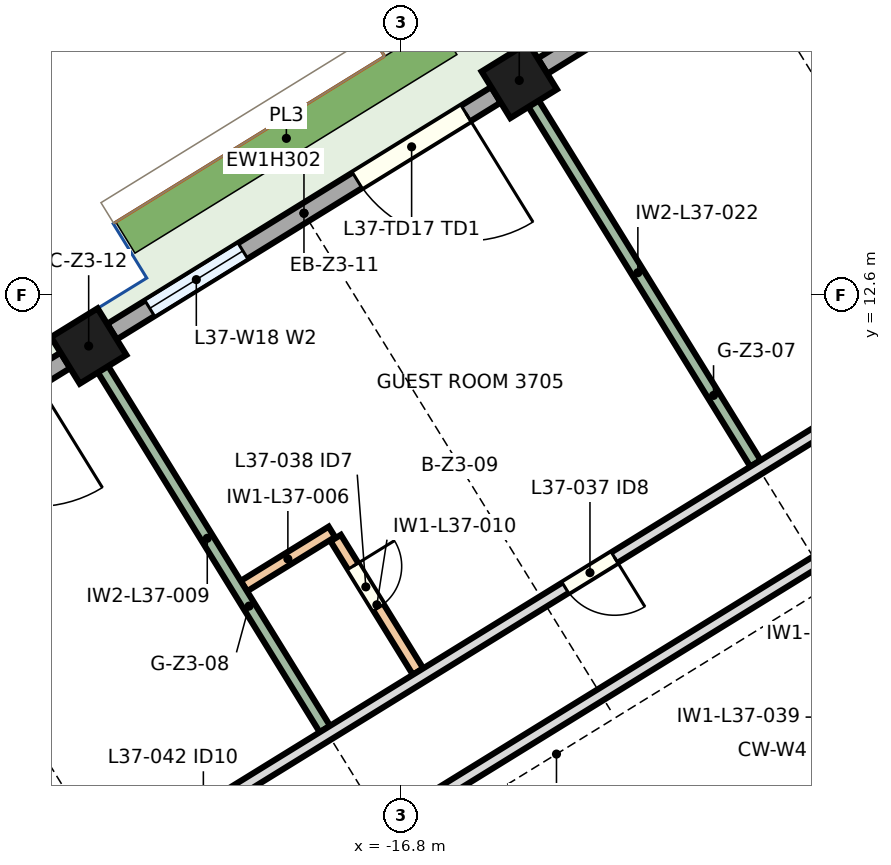
"""IFC4 building model, lengths in metres.
Left out: names, types, materials, properties, quantities, classifications, styles, units other than length and angle.
Written with IfcOpenShell. Run it as: python <this file> out.ifc"""

import sys

from ifc_helpers import new_model, si_unit, direction, frame, frame_2d, origin, origin_2d, place, context, subcontext, project, spatial, rectangle, extrude, element, fill, save


model = new_model("IFC4")
c1 = context("Model", 3, precision=1e-05, world=origin(), true_north=direction((0.0, 1.0)))
c2 = subcontext(c1, "Body", "Model", "MODEL_VIEW")
j1 = project(units=[si_unit("LENGTHUNIT", "METRE"), si_unit("PLANEANGLEUNIT", "RADIAN")], contexts=[c1])
p1 = place(None, origin())
s1 = spatial("IfcSite", under=j1, at=p1, CompositionType="ELEMENT")
p2 = place(p1, origin())
s2 = spatial("IfcBuilding", under=s1, at=p2, CompositionType="ELEMENT")
p3 = place(p2, frame((0.0, 0.0, 170.4)))
s3 = spatial("IfcBuildingStorey", under=s2, at=p3, CompositionType="ELEMENT", Elevation=170.4)
for number, where, z_axis, x_axis in (
    (1, (-14.854, 16.158, 0.0), (0.0, 0.0, 1.0), (0.851, 0.525, 0.0)),
    (2, (-21.935, 11.79, 0.0), (0.0, 0.0, 1.0), (0.851, 0.525, 0.0)),
):
    element("IfcColumn", number, at=place(p3, frame(where, z_axis=z_axis, x_axis=x_axis)), inside=s3, PredefinedType="COLUMN", context=c2, shape_type="SweptSolid", body=[
        extrude(rectangle(XDim=0.9, YDim=0.9, at=origin_2d()), origin(), (0.0, 0.0, 1.0), 3.55),
    ])
p4 = place(p3, frame((-10.301, 2.659, 0.0), z_axis=(0.0, 0.0, 1.0), x_axis=(0.500021842983, 0.866012792365, 0.0)))
e3 = element("IfcWall", 3, at=p4, inside=s3, PredefinedType="SHEAR", context=c2, shape_type="SweptSolid", body=[
    extrude(rectangle(XDim=5.694, YDim=0.75, at=frame_2d((2.847, 0.0))), origin(), (0.0, 0.0, 1.0), 3.8),
])
p5 = place(p3, frame((-8.156, 20.289, 0.0), z_axis=(0.0, 0.0, 1.0), x_axis=(-0.851111085575, -0.524985637909, 0.0)))
e4 = element("IfcWall", 4, at=p5, inside=s3, PredefinedType="SOLIDWALL", context=c2, shape_type="SweptSolid", body=[
    extrude(rectangle(XDim=7.42, YDim=0.3, at=frame_2d((3.71, 0.0))), origin(), (0.0, 0.0, 1.0), 3.02),
])
p6 = place(p5, frame((0.58, 0.0, 0.0)))
e5 = element("IfcOpeningElement", 5, at=p6, cuts=e4, PredefinedType="OPENING", context=c2, shape_type="SweptSolid", body=[
    extrude(rectangle(XDim=2.1, YDim=2.4, at=frame_2d((1.05, 1.2))), frame((0.0, 0.16, 0.0), z_axis=(0.0, -1.0, 0.0), x_axis=(1.0, 0.0, 0.0)), (0.0, 0.0, 1.0), 0.32),
])
p7 = place(p5, frame((4.89, 0.0, 0.9)))
e6 = element("IfcOpeningElement", 6, at=p7, cuts=e4, PredefinedType="OPENING", context=c2, shape_type="SweptSolid", body=[
    extrude(rectangle(XDim=1.8, YDim=1.5, at=frame_2d((0.9, 0.75))), frame((0.0, 0.16, 0.0), z_axis=(0.0, -1.0, 0.0), x_axis=(1.0, 0.0, 0.0)), (0.0, 0.0, 1.0), 0.32),
])
p8 = place(p3, frame((-15.237, 15.921, 0.0), z_axis=(0.0, 0.0, 1.0), x_axis=(-0.85112578684, -0.524961803349, 0.0)))
e7 = element("IfcWall", 7, at=p8, inside=s3, PredefinedType="SOLIDWALL", context=c2, shape_type="SweptSolid", body=[
    extrude(rectangle(XDim=7.42, YDim=0.3, at=frame_2d((3.71, 0.0))), origin(), (0.0, 0.0, 1.0), 3.02),
])
p9 = place(p8, frame((0.58, 0.0, 0.0)))
e8 = element("IfcOpeningElement", 8, at=p9, cuts=e7, PredefinedType="OPENING", context=c2, shape_type="SweptSolid", body=[
    extrude(rectangle(XDim=2.1, YDim=2.4, at=frame_2d((1.05, 1.2))), frame((0.0, 0.16, 0.0), z_axis=(0.0, -1.0, 0.0), x_axis=(1.0, 0.0, 0.0)), (0.0, 0.0, 1.0), 0.32),
])
p10 = place(p8, frame((4.89, 0.0, 0.9)))
e9 = element("IfcOpeningElement", 9, at=p10, cuts=e7, PredefinedType="OPENING", context=c2, shape_type="SweptSolid", body=[
    extrude(rectangle(XDim=1.8, YDim=1.5, at=frame_2d((0.9, 0.75))), frame((0.0, 0.16, 0.0), z_axis=(0.0, -1.0, 0.0), x_axis=(1.0, 0.0, 0.0)), (0.0, 0.0, 1.0), 0.32),
])
p11 = place(p3, frame((-22.318, 11.554, 0.0), z_axis=(0.0, 0.0, 1.0), x_axis=(-0.851111085575, -0.524985637909, 0.0)))
e10 = element("IfcWall", 10, at=p11, inside=s3, PredefinedType="SOLIDWALL", context=c2, shape_type="SweptSolid", body=[
    extrude(rectangle(XDim=7.42, YDim=0.3, at=frame_2d((3.71, 0.0))), origin(), (0.0, 0.0, 1.0), 3.02),
])
p12 = place(p11, frame((0.58, 0.0, 0.0)))
e11 = element("IfcOpeningElement", 11, at=p12, cuts=e10, PredefinedType="OPENING", context=c2, shape_type="SweptSolid", body=[
    extrude(rectangle(XDim=2.1, YDim=2.4, at=frame_2d((1.05, 1.2))), frame((0.0, 0.16, 0.0), z_axis=(0.0, -1.0, 0.0), x_axis=(1.0, 0.0, 0.0)), (0.0, 0.0, 1.0), 0.32),
])
p13 = place(p11, frame((4.89, 0.0, 0.9)))
e12 = element("IfcOpeningElement", 12, at=p13, cuts=e10, PredefinedType="OPENING", context=c2, shape_type="SweptSolid", body=[
    extrude(rectangle(XDim=1.8, YDim=1.5, at=frame_2d((0.9, 0.75))), frame((0.0, 0.16, 0.0), z_axis=(0.0, -1.0, 0.0), x_axis=(1.0, 0.0, 0.0)), (0.0, 0.0, 1.0), 0.32),
])
p14 = place(p3, frame((-19.383, 7.842, 0.0), z_axis=(0.0, 0.0, 1.0), x_axis=(0.851105638601, 0.524994468487, 0.0)))
e13 = element("IfcWall", 13, at=p14, inside=s3, PredefinedType="PARTITIONING", context=c2, shape_type="SweptSolid", body=[
    extrude(rectangle(XDim=1.7, YDim=0.2, at=frame_2d((0.85, 0.0))), origin(), (0.0, 0.0, 1.0), 3.55),
])
p15 = place(p3, frame((-18.05, 5.492, 0.0), z_axis=(0.0, 0.0, 1.0), x_axis=(-0.52498429839, 0.851111911821, 0.0)))
e14 = element("IfcWall", 14, at=p15, inside=s3, PredefinedType="PARTITIONING", context=c2, shape_type="SweptSolid", body=[
    extrude(rectangle(XDim=7.37, YDim=0.2, at=frame_2d((3.685, 0.0))), origin(), (0.0, 0.0, 1.0), 2.65),
])
p16 = place(p3, frame((-17.873, 8.632, 0.0), z_axis=(0.0, 0.0, 1.0), x_axis=(0.525005247362, -0.851098989685, 0.0)))
e15 = element("IfcWall", 15, at=p16, inside=s3, PredefinedType="PARTITIONING", context=c2, shape_type="SweptSolid", body=[
    extrude(rectangle(XDim=2.58, YDim=0.2, at=frame_2d((1.29, 0.0))), origin(), (0.0, 0.0, 1.0), 3.55),
])
p17 = place(p16, frame((0.544, 0.0, 0.0)))
e16 = element("IfcOpeningElement", 16, at=p17, cuts=e15, PredefinedType="OPENING", context=c2, shape_type="SweptSolid", body=[
    extrude(rectangle(XDim=0.8, YDim=2.1, at=frame_2d((0.4, 1.05))), frame((0.0, 0.11, 0.0), z_axis=(0.0, -1.0, 0.0), x_axis=(1.0, 0.0, 0.0)), (0.0, 0.0, 1.0), 0.22),
])
p18 = place(p3, frame((-10.969, 9.859, 0.0), z_axis=(0.0, 0.0, 1.0), x_axis=(-0.52498429839, 0.851111911821, 0.0)))
e17 = element("IfcWall", 17, at=p18, inside=s3, PredefinedType="PARTITIONING", context=c2, shape_type="SweptSolid", body=[
    extrude(rectangle(XDim=7.37, YDim=0.2, at=frame_2d((3.685, 0.0))), origin(), (0.0, 0.0, 1.0), 2.65),
])
p19 = place(p3, frame((6.761, 18.563, 0.0), z_axis=(0.0, 0.0, 1.0), x_axis=(-0.851115762051, -0.524978056292, 0.0)))
e18 = element("IfcWall", 18, at=p19, inside=s3, PredefinedType="PARTITIONING", context=c2, shape_type="SweptSolid", body=[
    extrude(rectangle(XDim=30.88, YDim=0.2, at=frame_2d((15.44, 0.0))), origin(), (0.0, 0.0, 1.0), 3.55),
])
p20 = place(p19, frame((13.067, 0.0, 0.0)))
e19 = element("IfcOpeningElement", 19, at=p20, cuts=e18, PredefinedType="OPENING", context=c2, shape_type="SweptSolid", body=[
    extrude(rectangle(XDim=0.9, YDim=2.1, at=frame_2d((0.45, 1.05))), frame((0.0, 0.11, 0.0), z_axis=(0.0, -1.0, 0.0), x_axis=(1.0, 0.0, 0.0)), (0.0, 0.0, 1.0), 0.22),
])
p21 = place(p19, frame((4.594, 0.0, 0.0)))
e20 = element("IfcOpeningElement", 20, at=p21, cuts=e18, PredefinedType="OPENING", context=c2, shape_type="SweptSolid", body=[
    extrude(rectangle(XDim=2.0, YDim=2.1, at=frame_2d((1.0, 1.05))), frame((0.0, 0.11, 0.0), z_axis=(0.0, -1.0, 0.0), x_axis=(1.0, 0.0, 0.0)), (0.0, 0.0, 1.0), 0.22),
])
p22 = place(p3, frame((7.348, 21.04, 0.0), z_axis=(0.0, 0.0, 1.0), x_axis=(-0.85111711572, -0.524975861662, 0.0)))
e21 = element("IfcWall", 21, at=p22, inside=s3, PredefinedType="PARTITIONING", context=c2, shape_type="SweptSolid", body=[
    extrude(rectangle(XDim=34.6, YDim=0.2, at=frame_2d((17.3, 0.0))), origin(), (0.0, 0.0, 1.0), 3.55),
])
p23 = place(p22, frame((7.12, 0.0, 0.0)))
e22 = element("IfcOpeningElement", 22, at=p23, cuts=e21, PredefinedType="OPENING", context=c2, shape_type="SweptSolid", body=[
    extrude(rectangle(XDim=1.0, YDim=2.1, at=frame_2d((0.5, 1.05))), frame((0.0, 0.11, 0.0), z_axis=(0.0, -1.0, 0.0), x_axis=(1.0, 0.0, 0.0)), (0.0, 0.0, 1.0), 0.22),
])
p24 = place(p22, frame((24.245, 0.0, 0.0)))
e23 = element("IfcOpeningElement", 23, at=p24, cuts=e21, PredefinedType="OPENING", context=c2, shape_type="SweptSolid", body=[
    extrude(rectangle(XDim=0.95, YDim=2.1, at=frame_2d((0.475, 1.05))), frame((0.0, 0.11, 0.0), z_axis=(0.0, -1.0, 0.0), x_axis=(1.0, 0.0, 0.0)), (0.0, 0.0, 1.0), 0.22),
])
p25 = place(p22, frame((0.65, 0.0, 0.0)))
e24 = element("IfcOpeningElement", 24, at=p25, cuts=e21, PredefinedType="OPENING", context=c2, shape_type="SweptSolid", body=[
    extrude(rectangle(XDim=1.0, YDim=2.1, at=frame_2d((0.5, 1.05))), frame((0.0, 0.11, 0.0), z_axis=(0.0, -1.0, 0.0), x_axis=(1.0, 0.0, 0.0)), (0.0, 0.0, 1.0), 0.22),
])
p26 = place(p22, frame((31.64, 0.0, 0.0)))
e25 = element("IfcOpeningElement", 25, at=p26, cuts=e21, PredefinedType="OPENING", context=c2, shape_type="SweptSolid", body=[
    extrude(rectangle(XDim=1.1, YDim=2.1, at=frame_2d((0.55, 1.05))), frame((0.0, 0.11, 0.0), z_axis=(0.0, -1.0, 0.0), x_axis=(1.0, 0.0, 0.0)), (0.0, 0.0, 1.0), 0.22),
])
p27 = place(p9, origin())
e26 = element("IfcDoor", 26, at=p27, inside=s3, OperationType="SLIDING_TO_LEFT", PredefinedType="DOOR", context=c2, shape_type="SweptSolid", body=[
    extrude(rectangle(XDim=2.1, YDim=2.4, at=frame_2d((1.05, 1.2))), frame((0.0, 0.025, 0.0), z_axis=(0.0, -1.0, 0.0), x_axis=(1.0, 0.0, 0.0)), (0.0, 0.0, 1.0), 0.05),
])
fill(e8, e26)
p28 = place(p10, origin())
e27 = element("IfcWindow", 27, at=p28, inside=s3, PartitioningType="SINGLE_PANEL", PredefinedType="WINDOW", context=c2, shape_type="SweptSolid", body=[
    extrude(rectangle(XDim=1.8, YDim=1.5, at=frame_2d((0.9, 0.75))), frame((0.0, 0.03, 0.0), z_axis=(0.0, -1.0, 0.0), x_axis=(1.0, 0.0, 0.0)), (0.0, 0.0, 1.0), 0.06),
])
fill(e9, e27)
p29 = place(p24, origin())
e28 = element("IfcDoor", 28, at=p29, inside=s3, OperationType="NOTDEFINED", PredefinedType="DOOR", context=c2, shape_type="SweptSolid", body=[
    extrude(rectangle(XDim=0.95, YDim=2.1, at=frame_2d((0.475, 1.05))), frame((0.0, 0.025, 0.0), z_axis=(0.0, -1.0, 0.0), x_axis=(1.0, 0.0, 0.0)), (0.0, 0.0, 1.0), 0.05),
])
fill(e23, e28)
p30 = place(p17, origin())
e29 = element("IfcDoor", 29, at=p30, inside=s3, OperationType="NOTDEFINED", PredefinedType="DOOR", context=c2, shape_type="SweptSolid", body=[
    extrude(rectangle(XDim=0.8, YDim=2.1, at=frame_2d((0.4, 1.05))), frame((0.0, 0.025, 0.0), z_axis=(0.0, -1.0, 0.0), x_axis=(1.0, 0.0, 0.0)), (0.0, 0.0, 1.0), 0.05),
])
fill(e16, e29)
save(model, sys.argv[1])
